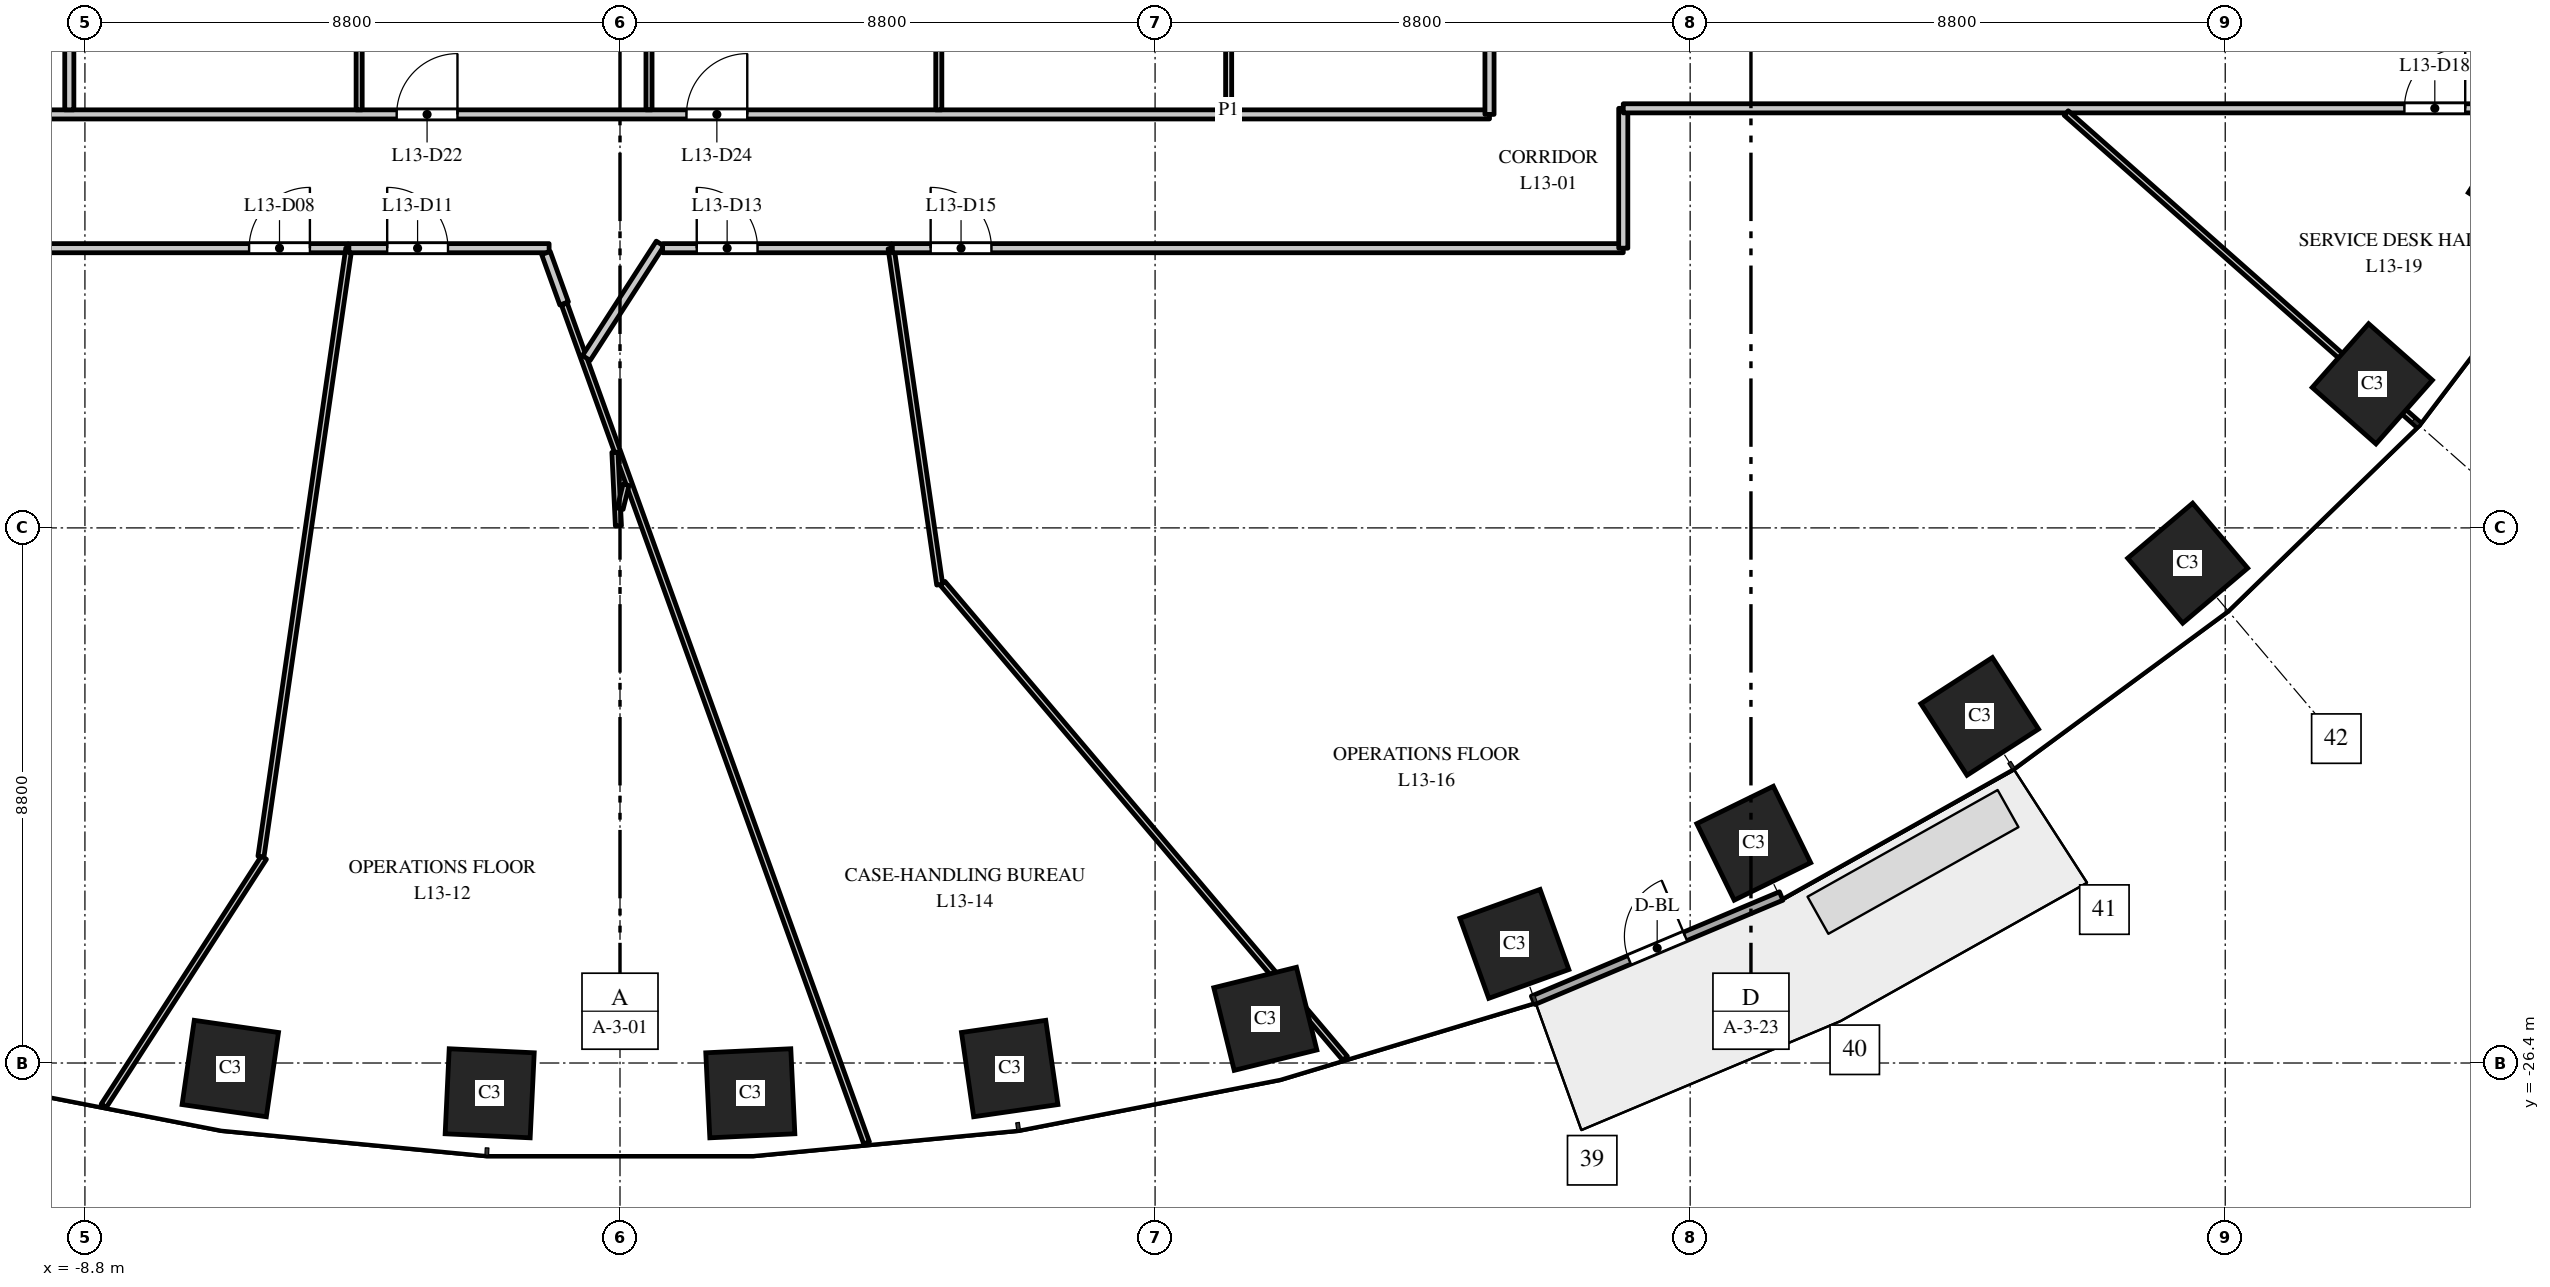
"""IFC4 building model, lengths in metres.
Left out: names, types, materials, properties, quantities, classifications, styles, units other than length and angle.
Written with IfcOpenShell. Run it as: python <this file> out.ifc"""

import sys

from ifc_helpers import new_model, si_unit, direction, frame, frame_2d, origin, origin_2d, place, context, subcontext, project, spatial, rectangle, extrude, element, fill, save


model = new_model("IFC4")
c1 = context("Model", 3, precision=1e-05, world=origin(), true_north=direction((0.0, 1.0)))
c2 = subcontext(c1, "Body", "Model", "MODEL_VIEW")
j1 = project(units=[si_unit("LENGTHUNIT", "METRE"), si_unit("PLANEANGLEUNIT", "RADIAN")], contexts=[c1])
p1 = place(None, origin())
s1 = spatial("IfcSite", under=j1, at=p1, CompositionType="ELEMENT")
p2 = place(p1, origin())
s2 = spatial("IfcBuilding", under=s1, at=p2, CompositionType="ELEMENT")
p3 = place(p2, frame((0.0, 0.0, 62.5)))
s3 = spatial("IfcBuildingStorey", under=s2, at=p3, CompositionType="ELEMENT", Elevation=62.5)
for number, where, z_axis, x_axis in (
    (1, (-6.409, -26.491, 0.0), (0.0, 0.0, 1.0), (0.99, -0.143, 0.0)),
    (2, (-2.143, -26.898, 0.0), (0.0, 0.0, 1.0), (0.999, -0.048, 0.0)),
    (3, (2.143, -26.898, 0.0), (0.0, 0.0, 1.0), (0.999, 0.048, 0.0)),
    (4, (6.409, -26.491, 0.0), (0.0, 0.0, 1.0), (0.99, 0.143, 0.0)),
    (5, (10.613, -25.674, 0.0), (0.0, 0.0, 1.0), (0.971, 0.24, 0.0)),
    (6, (14.709, -24.441, 0.0), (0.0, 0.0, 1.0), (0.941, 0.338, 0.0)),
    (7, (18.646, -22.785, 0.0), (0.0, 0.0, 1.0), (0.898, 0.439, 0.0)),
    (8, (22.362, -20.7, 0.0), (0.0, 0.0, 1.0), (0.84, 0.542, 0.0)),
    (9, (25.783, -18.18, 0.0), (0.0, 0.0, 1.0), (0.763, 0.646, 0.0)),
    (10, (28.819, -15.23, 0.0), (0.0, 0.0, 1.0), (0.663, 0.749, 0.0)),
    (11, (31.365, -11.871, 0.0), (0.0, 0.0, 1.0), (0.535, 0.845, 0.0)),
):
    element("IfcColumn", number, at=place(p3, frame(where, z_axis=z_axis, x_axis=x_axis)), inside=s3, PredefinedType="COLUMN", context=c2, shape_type="SweptSolid", body=[
        extrude(rectangle(XDim=1.4, YDim=1.4, at=origin_2d()), origin(), (0.0, 0.0, 1.0), 4.0),
    ])
p4 = place(p3, frame((15.018, -25.369, 0.0), z_axis=(0.0, 0.0, 1.0), x_axis=(0.921816985161, 0.387625393736, 0.0)))
e12 = element("IfcWall", 12, at=p4, inside=s3, PredefinedType="STANDARD", context=c2, shape_type="SweptSolid", body=[
    extrude(rectangle(XDim=4.426, YDim=0.15, at=frame_2d((2.213, 0.0))), origin(), (0.0, 0.0, 1.0), 3.7),
])
p5 = place(p4, frame((1.713, 0.0, 0.0)))
e13 = element("IfcOpeningElement", 13, at=p5, cuts=e12, PredefinedType="OPENING", context=c2, shape_type="SweptSolid", body=[
    extrude(rectangle(XDim=1.0, YDim=2.4, at=frame_2d((0.5, 1.2))), frame((0.0, 0.085, 0.0), z_axis=(0.0, -1.0, 0.0), x_axis=(1.0, 0.0, 0.0)), (0.0, 0.0, 1.0), 0.17),
])
p6 = place(p3, frame((-16.5, -13.0, 0.0), z_axis=(0.0, 0.0, 1.0), x_axis=(1.0, 0.0, 0.0)))
e14 = element("IfcWall", 14, at=p6, inside=s3, PredefinedType="PARTITIONING", context=c2, shape_type="SweptSolid", body=[
    extrude(rectangle(XDim=12.021, YDim=0.15, at=frame_2d((6.01, 0.0))), origin(), (0.0, 0.0, 1.0), 2.85),
])
p7 = place(p6, frame((10.4, 0.0, 0.0)))
e15 = element("IfcOpeningElement", 15, at=p7, cuts=e14, PredefinedType="OPENING", context=c2, shape_type="SweptSolid", body=[
    extrude(rectangle(XDim=1.0, YDim=2.1, at=frame_2d((0.5, 1.05))), frame((0.0, 0.085, 0.0), z_axis=(0.0, -1.0, 0.0), x_axis=(1.0, 0.0, 0.0)), (0.0, 0.0, 1.0), 0.17),
])
p8 = place(p3, frame((-14.3, -10.8, 0.0), z_axis=(0.0, 0.0, 1.0), x_axis=(1.0, 0.0, 0.0)))
e16 = element("IfcWall", 16, at=p8, inside=s3, PredefinedType="PARTITIONING", context=c2, shape_type="SweptSolid", body=[
    extrude(rectangle(XDim=28.6, YDim=0.15, at=frame_2d((14.3, 0.0))), origin(), (0.0, 0.0, 1.0), 2.85),
])
p9 = place(p8, frame((10.627, 0.0, 0.0)))
e17 = element("IfcOpeningElement", 17, at=p9, cuts=e16, PredefinedType="OPENING", context=c2, shape_type="SweptSolid", body=[
    extrude(rectangle(XDim=1.0, YDim=2.1, at=frame_2d((0.5, 1.05))), frame((0.0, 0.085, 0.0), z_axis=(0.0, -1.0, 0.0), x_axis=(1.0, 0.0, 0.0)), (0.0, 0.0, 1.0), 0.17),
])
p10 = place(p8, frame((15.393, 0.0, 0.0)))
e18 = element("IfcOpeningElement", 18, at=p10, cuts=e16, PredefinedType="OPENING", context=c2, shape_type="SweptSolid", body=[
    extrude(rectangle(XDim=1.0, YDim=2.1, at=frame_2d((0.5, 1.05))), frame((0.0, 0.085, 0.0), z_axis=(0.0, -1.0, 0.0), x_axis=(1.0, 0.0, 0.0)), (0.0, 0.0, 1.0), 0.17),
])
p11 = place(p3, frame((-9.057, -10.725, 0.0), z_axis=(0.0, 0.0, 1.0), x_axis=(0.0, 1.0, 0.0)))
e19 = element("IfcWall", 19, at=p11, inside=s3, PredefinedType="PARTITIONING", context=c2, shape_type="SweptSolid", body=[
    extrude(rectangle(XDim=10.68, YDim=0.15, at=frame_2d((5.34, 0.0))), origin(), (0.0, 0.0, 1.0), 2.75),
])
p12 = place(p11, frame((5.075, 0.0, 0.0)))
e20 = element("IfcOpeningElement", 20, at=p12, cuts=e19, PredefinedType="OPENING", context=c2, shape_type="SweptSolid", body=[
    extrude(rectangle(XDim=1.0, YDim=2.1, at=frame_2d((0.5, 1.05))), frame((0.0, 0.085, 0.0), z_axis=(0.0, -1.0, 0.0), x_axis=(1.0, 0.0, 0.0)), (0.0, 0.0, 1.0), 0.17),
])
p13 = place(p3, frame((-8.491, -27.104, 0.0), z_axis=(0.0, 0.0, 1.0), x_axis=(0.542285995048, 0.840193965448, 0.0)))
e21 = element("IfcWall", 21, at=p13, inside=s3, PredefinedType="PARTITIONING", context=c2, shape_type="SweptSolid", body=[
    extrude(rectangle(XDim=4.857, YDim=0.1, at=frame_2d((2.429, 0.0))), origin(), (0.0, 0.0, 1.0), 2.85),
])
p14 = place(p3, frame((-5.905, -23.005, 0.0), z_axis=(0.0, 0.0, 1.0), x_axis=(0.143007570509, 0.98972159458, 0.0)))
e22 = element("IfcWall", 22, at=p14, inside=s3, PredefinedType="PARTITIONING", context=c2, shape_type="SweptSolid", body=[
    extrude(rectangle(XDim=10.105, YDim=0.1, at=frame_2d((5.052, 0.0))), origin(), (0.0, 0.0, 1.0), 3.7),
])
p15 = place(p3, frame((-4.459, -13.0, 0.0), z_axis=(0.0, 0.0, 1.0), x_axis=(1.0, 0.0, 0.0)))
e23 = element("IfcWall", 23, at=p15, inside=s3, PredefinedType="PARTITIONING", context=c2, shape_type="SweptSolid", body=[
    extrude(rectangle(XDim=3.293, YDim=0.15, at=frame_2d((1.646, 0.0))), origin(), (0.0, 0.0, 1.0), 3.7),
])
p16 = place(p15, frame((0.63, 0.0, 0.0)))
e24 = element("IfcOpeningElement", 24, at=p16, cuts=e23, PredefinedType="OPENING", context=c2, shape_type="SweptSolid", body=[
    extrude(rectangle(XDim=1.0, YDim=2.1, at=frame_2d((0.5, 1.05))), frame((0.0, 0.085, 0.0), z_axis=(0.0, -1.0, 0.0), x_axis=(1.0, 0.0, 0.0)), (0.0, 0.0, 1.0), 0.17),
])
p17 = place(p3, frame((-4.29, -10.725, 0.0), z_axis=(0.0, 0.0, 1.0), x_axis=(0.0, 1.0, 0.0)))
e25 = element("IfcWall", 25, at=p17, inside=s3, PredefinedType="PARTITIONING", context=c2, shape_type="SweptSolid", body=[
    extrude(rectangle(XDim=4.157, YDim=0.1, at=frame_2d((2.079, 0.0))), origin(), (0.0, 0.0, 1.0), 2.85),
])
p18 = place(p3, frame((-1.218, -13.079, 0.0), z_axis=(0.0, 0.0, 1.0), x_axis=(0.339052677967, -0.940767389722, 0.0)))
e26 = element("IfcWall", 26, at=p18, inside=s3, PredefinedType="PARTITIONING", context=c2, shape_type="SweptSolid", body=[
    extrude(rectangle(XDim=0.882, YDim=0.15, at=frame_2d((0.441, 0.0))), origin(), (0.0, 0.0, 1.0), 2.85),
])
p19 = place(p3, frame((-0.916, -13.918, 0.0), z_axis=(0.0, 0.0, 1.0), x_axis=(0.338981210053, -0.940793143699, 0.0)))
e27 = element("IfcWall", 27, at=p19, inside=s3, PredefinedType="PARTITIONING", context=c2, shape_type="SweptSolid", body=[
    extrude(rectangle(XDim=14.664, YDim=0.1, at=frame_2d((7.332, 0.0))), origin(), (0.0, 0.0, 1.0), 2.85),
])
p20 = place(p3, frame((-0.084, -16.356, 0.0), z_axis=(0.0, 0.0, 1.0), x_axis=(0.047967320325, -0.998848905581, 0.0)))
e28 = element("IfcWall", 28, at=p20, inside=s3, PredefinedType="PARTITIONING", context=c2, shape_type="SweptSolid", body=[
    extrude(rectangle(XDim=1.211, YDim=0.1, at=frame_2d((0.606, 0.0))), origin(), (0.0, 0.0, 1.0), 3.7),
])
p21 = place(p3, frame((-0.554, -14.806, 0.0), z_axis=(0.0, 0.0, 1.0), x_axis=(0.542256038928, 0.840213299256, 0.0)))
e29 = element("IfcWall", 29, at=p21, inside=s3, PredefinedType="PARTITIONING", context=c2, shape_type="SweptSolid", body=[
    extrude(rectangle(XDim=2.239, YDim=0.15, at=frame_2d((1.119, 0.0))), origin(), (0.0, 0.0, 1.0), 3.7),
])
p22 = place(p3, frame((0.002, -17.284, 0.0), z_axis=(0.0, 0.0, 1.0), x_axis=(0.240121592304, 0.970742819139, 0.0)))
e30 = element("IfcWall", 30, at=p22, inside=s3, PredefinedType="PARTITIONING", context=c2, shape_type="SweptSolid", body=[
    extrude(rectangle(XDim=0.405, YDim=0.1, at=frame_2d((0.202, 0.0))), origin(), (0.0, 0.0, 1.0), 3.7),
])
p23 = place(p3, frame((0.477, -10.725, 0.0), z_axis=(0.0, 0.0, 1.0), x_axis=(0.0, 1.0, 0.0)))
e31 = element("IfcWall", 31, at=p23, inside=s3, PredefinedType="PARTITIONING", context=c2, shape_type="SweptSolid", body=[
    extrude(rectangle(XDim=3.257, YDim=0.1, at=frame_2d((1.628, 0.0))), origin(), (0.0, 0.0, 1.0), 2.85),
])
p24 = place(p3, frame((0.701, -13.0, 0.0), z_axis=(0.0, 0.0, 1.0), x_axis=(1.0, 0.0, 0.0)))
e32 = element("IfcWall", 32, at=p24, inside=s3, PredefinedType="PARTITIONING", context=c2, shape_type="SweptSolid", body=[
    extrude(rectangle(XDim=3.758, YDim=0.15, at=frame_2d((1.879, 0.0))), origin(), (0.0, 0.0, 1.0), 2.85),
])
p25 = place(p24, frame((0.561, 0.0, 0.0)))
e33 = element("IfcOpeningElement", 33, at=p25, cuts=e32, PredefinedType="OPENING", context=c2, shape_type="SweptSolid", body=[
    extrude(rectangle(XDim=1.0, YDim=2.1, at=frame_2d((0.5, 1.05))), frame((0.0, 0.085, 0.0), z_axis=(0.0, -1.0, 0.0), x_axis=(1.0, 0.0, 0.0)), (0.0, 0.0, 1.0), 0.17),
])
p26 = place(p3, frame((4.459, -13.004, 0.0), z_axis=(0.0, 0.0, 1.0), x_axis=(0.143036391033, -0.989717429795, 0.0)))
e34 = element("IfcWall", 34, at=p26, inside=s3, PredefinedType="PARTITIONING", context=c2, shape_type="SweptSolid", body=[
    extrude(rectangle(XDim=5.586, YDim=0.1, at=frame_2d((2.793, 0.0))), origin(), (0.0, 0.0, 1.0), 3.7),
])
p27 = place(p3, frame((4.479, -13.0, 0.0), z_axis=(0.0, 0.0, 1.0), x_axis=(1.0, 0.0, 0.0)))
e35 = element("IfcWall", 35, at=p27, inside=s3, PredefinedType="PARTITIONING", context=c2, shape_type="SweptSolid", body=[
    extrude(rectangle(XDim=12.021, YDim=0.15, at=frame_2d((6.01, 0.0))), origin(), (0.0, 0.0, 1.0), 2.85),
])
p28 = place(p27, frame((0.63, 0.0, 0.0)))
e36 = element("IfcOpeningElement", 36, at=p28, cuts=e35, PredefinedType="OPENING", context=c2, shape_type="SweptSolid", body=[
    extrude(rectangle(XDim=1.0, YDim=2.1, at=frame_2d((0.5, 1.05))), frame((0.0, 0.085, 0.0), z_axis=(0.0, -1.0, 0.0), x_axis=(1.0, 0.0, 0.0)), (0.0, 0.0, 1.0), 0.17),
])
p29 = place(p3, frame((5.243, -10.725, 0.0), z_axis=(0.0, 0.0, 1.0), x_axis=(0.0, 1.0, 0.0)))
e37 = element("IfcWall", 37, at=p29, inside=s3, PredefinedType="PARTITIONING", context=c2, shape_type="SweptSolid", body=[
    extrude(rectangle(XDim=4.666, YDim=0.1, at=frame_2d((2.333, 0.0))), origin(), (0.0, 0.0, 1.0), 2.85),
])
p30 = place(p3, frame((5.306, -18.512, 0.0), z_axis=(0.0, 0.0, 1.0), x_axis=(0.646500054355, -0.762913939917, 0.0)))
e38 = element("IfcWall", 38, at=p30, inside=s3, PredefinedType="PARTITIONING", context=c2, shape_type="SweptSolid", body=[
    extrude(rectangle(XDim=10.239, YDim=0.1, at=frame_2d((5.119, 0.0))), origin(), (0.0, 0.0, 1.0), 2.85),
])
p31 = place(p3, frame((10.01, -10.725, 0.0), z_axis=(0.0, 0.0, 1.0), x_axis=(0.0, 1.0, 0.0)))
e39 = element("IfcWall", 39, at=p31, inside=s3, PredefinedType="PARTITIONING", context=c2, shape_type="SweptSolid", body=[
    extrude(rectangle(XDim=21.45, YDim=0.1, at=frame_2d((10.725, 0.0))), origin(), (0.0, 0.0, 1.0), 2.75),
])
p32 = place(p3, frame((14.3, -10.8, 0.0), z_axis=(0.0, 0.0, 1.0), x_axis=(0.0, 1.0, 0.0)))
e40 = element("IfcWall", 40, at=p32, inside=s3, PredefinedType="PARTITIONING", context=c2, shape_type="SweptSolid", body=[
    extrude(rectangle(XDim=21.6, YDim=0.15, at=frame_2d((10.8, 0.0))), origin(), (0.0, 0.0, 1.0), 2.75),
])
p33 = place(p32, frame((19.95, 0.0, 0.0)))
e41 = element("IfcOpeningElement", 41, at=p33, cuts=e40, PredefinedType="OPENING", context=c2, shape_type="SweptSolid", body=[
    extrude(rectangle(XDim=1.0, YDim=2.1, at=frame_2d((0.5, 1.05))), frame((0.0, 0.085, 0.0), z_axis=(0.0, -1.0, 0.0), x_axis=(1.0, 0.0, 0.0)), (0.0, 0.0, 1.0), 0.17),
])
p34 = place(p3, frame((16.5, -13.0, 0.0), z_axis=(0.0, 0.0, 1.0), x_axis=(0.0, 1.0, 0.0)))
e42 = element("IfcWall", 42, at=p34, inside=s3, PredefinedType="PARTITIONING", context=c2, shape_type="SweptSolid", body=[
    extrude(rectangle(XDim=2.3, YDim=0.15, at=frame_2d((1.15, 0.0))), origin(), (0.0, 0.0, 1.0), 3.7),
])
p35 = place(p3, frame((16.5, -10.7, 0.0), z_axis=(0.0, 0.0, 1.0), x_axis=(1.0, 0.0, 0.0)))
e43 = element("IfcWall", 43, at=p35, inside=s3, PredefinedType="PARTITIONING", context=c2, shape_type="SweptSolid", body=[
    extrude(rectangle(XDim=15.0, YDim=0.15, at=frame_2d((7.5, 0.0))), origin(), (0.0, 0.0, 1.0), 2.75),
])
p36 = place(p35, frame((12.847, 0.0, 0.0)))
e44 = element("IfcOpeningElement", 44, at=p36, cuts=e43, PredefinedType="OPENING", context=c2, shape_type="SweptSolid", body=[
    extrude(rectangle(XDim=1.0, YDim=2.1, at=frame_2d((0.5, 1.05))), frame((0.0, 0.085, 0.0), z_axis=(0.0, -1.0, 0.0), x_axis=(1.0, 0.0, 0.0)), (0.0, 0.0, 1.0), 0.17),
])
p37 = place(p3, frame((23.785, -10.778, 0.0), z_axis=(0.0, 0.0, 1.0), x_axis=(0.748985701008, -0.662586160198, 0.0)))
e45 = element("IfcWall", 45, at=p37, inside=s3, PredefinedType="PARTITIONING", context=c2, shape_type="SweptSolid", body=[
    extrude(rectangle(XDim=7.723, YDim=0.1, at=frame_2d((3.861, 0.0))), origin(), (0.0, 0.0, 1.0), 3.7),
])
p38 = place(p5, origin())
e46 = element("IfcDoor", 46, at=p38, inside=s3, OperationType="SINGLE_SWING_RIGHT", PredefinedType="DOOR", context=c2, shape_type="SweptSolid", body=[
    extrude(rectangle(XDim=1.0, YDim=2.4, at=frame_2d((0.5, 1.2))), frame((0.0, 0.025, 0.0), z_axis=(0.0, -1.0, 0.0), x_axis=(1.0, 0.0, 0.0)), (0.0, 0.0, 1.0), 0.05),
])
fill(e13, e46)
p39 = place(p7, origin())
e47 = element("IfcDoor", 47, at=p39, inside=s3, OperationType="SINGLE_SWING_RIGHT", PredefinedType="DOOR", context=c2, shape_type="SweptSolid", body=[
    extrude(rectangle(XDim=1.0, YDim=2.1, at=frame_2d((0.5, 1.05))), frame((0.0, 0.025, 0.0), z_axis=(0.0, -1.0, 0.0), x_axis=(1.0, 0.0, 0.0)), (0.0, 0.0, 1.0), 0.05),
])
fill(e15, e47)
p40 = place(p16, origin())
e48 = element("IfcDoor", 48, at=p40, inside=s3, OperationType="SINGLE_SWING_LEFT", PredefinedType="DOOR", context=c2, shape_type="SweptSolid", body=[
    extrude(rectangle(XDim=1.0, YDim=2.1, at=frame_2d((0.5, 1.05))), frame((0.0, 0.025, 0.0), z_axis=(0.0, -1.0, 0.0), x_axis=(1.0, 0.0, 0.0)), (0.0, 0.0, 1.0), 0.05),
])
fill(e24, e48)
p41 = place(p25, origin())
e49 = element("IfcDoor", 49, at=p41, inside=s3, OperationType="SINGLE_SWING_LEFT", PredefinedType="DOOR", context=c2, shape_type="SweptSolid", body=[
    extrude(rectangle(XDim=1.0, YDim=2.1, at=frame_2d((0.5, 1.05))), frame((0.0, 0.025, 0.0), z_axis=(0.0, -1.0, 0.0), x_axis=(1.0, 0.0, 0.0)), (0.0, 0.0, 1.0), 0.05),
])
fill(e33, e49)
p42 = place(p28, origin())
e50 = element("IfcDoor", 50, at=p42, inside=s3, OperationType="SINGLE_SWING_LEFT", PredefinedType="DOOR", context=c2, shape_type="SweptSolid", body=[
    extrude(rectangle(XDim=1.0, YDim=2.1, at=frame_2d((0.5, 1.05))), frame((0.0, 0.025, 0.0), z_axis=(0.0, -1.0, 0.0), x_axis=(1.0, 0.0, 0.0)), (0.0, 0.0, 1.0), 0.05),
])
fill(e36, e50)
p43 = place(p36, origin())
e51 = element("IfcDoor", 51, at=p43, inside=s3, OperationType="SINGLE_SWING_RIGHT", PredefinedType="DOOR", context=c2, shape_type="SweptSolid", body=[
    extrude(rectangle(XDim=1.0, YDim=2.1, at=frame_2d((0.5, 1.05))), frame((0.0, 0.025, 0.0), z_axis=(0.0, -1.0, 0.0), x_axis=(1.0, 0.0, 0.0)), (0.0, 0.0, 1.0), 0.05),
])
fill(e44, e51)
p44 = place(p9, origin())
e52 = element("IfcDoor", 52, at=p44, inside=s3, OperationType="SINGLE_SWING_RIGHT", PredefinedType="DOOR", context=c2, shape_type="SweptSolid", body=[
    extrude(rectangle(XDim=1.0, YDim=2.1, at=frame_2d((0.5, 1.05))), frame((0.0, 0.025, 0.0), z_axis=(0.0, -1.0, 0.0), x_axis=(1.0, 0.0, 0.0)), (0.0, 0.0, 1.0), 0.05),
])
fill(e17, e52)
p45 = place(p10, origin())
e53 = element("IfcDoor", 53, at=p45, inside=s3, OperationType="SINGLE_SWING_RIGHT", PredefinedType="DOOR", context=c2, shape_type="SweptSolid", body=[
    extrude(rectangle(XDim=1.0, YDim=2.1, at=frame_2d((0.5, 1.05))), frame((0.0, 0.025, 0.0), z_axis=(0.0, -1.0, 0.0), x_axis=(1.0, 0.0, 0.0)), (0.0, 0.0, 1.0), 0.05),
])
fill(e18, e53)
save(model, sys.argv[1])
